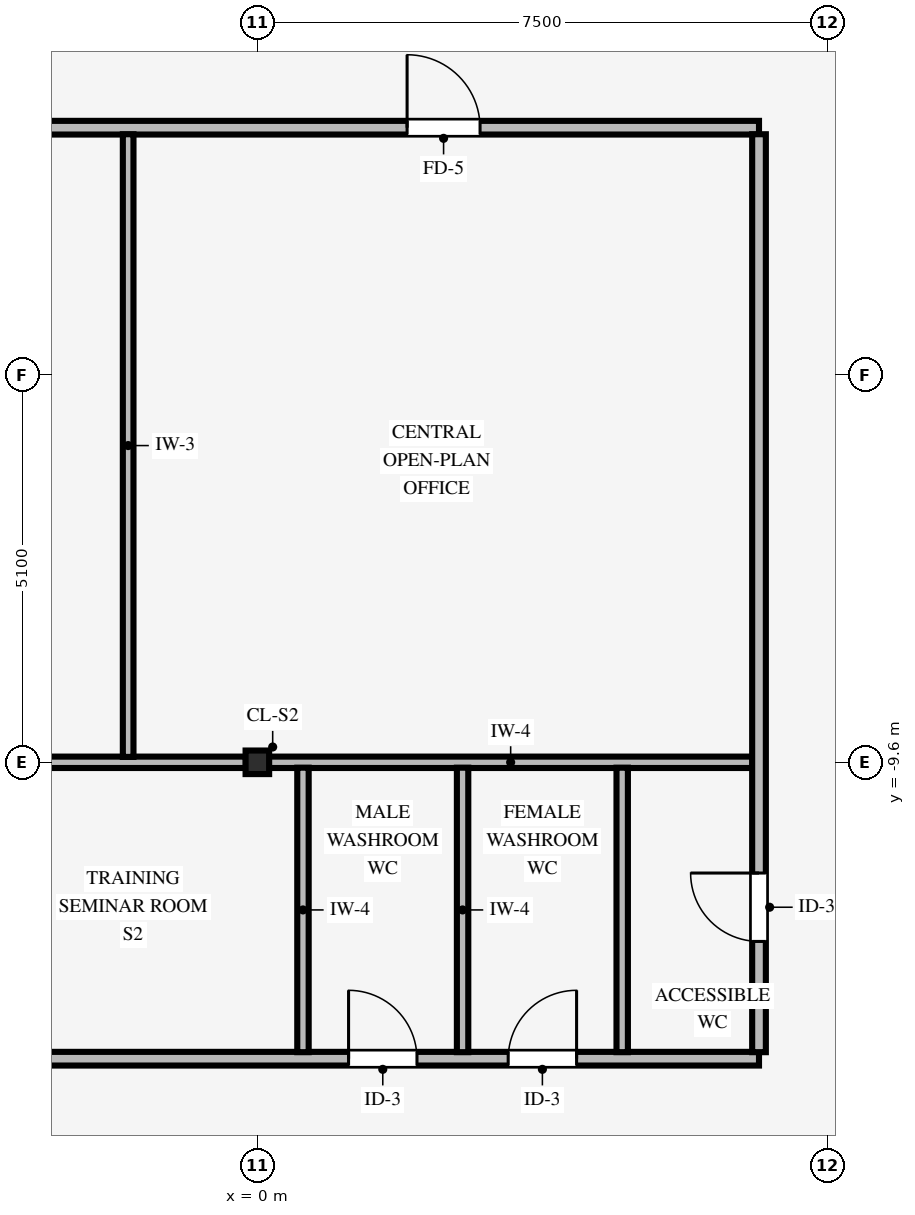
"""IFC4 building model, lengths in metres.
Left out: names, types, materials, properties, quantities, classifications, styles, units other than length and angle.
Written with IfcOpenShell. Run it as: python <this file> out.ifc"""

import sys

from ifc_helpers import new_model, si_unit, direction, frame, frame_2d, origin, origin_2d, place, context, subcontext, project, spatial, rectangle, i_section, extrude, source, transform, mapped, element, fill, save


model = new_model("IFC4")
c1 = context("Model", 3, precision=1e-05, world=origin(), true_north=direction((0.0, 1.0)))
c2 = subcontext(c1, "Body", "Model", "MODEL_VIEW")
j1 = project(units=[si_unit("LENGTHUNIT", "METRE"), si_unit("PLANEANGLEUNIT", "RADIAN")], contexts=[c1])
p1 = place(None, origin())
s1 = spatial("IfcSite", under=j1, at=p1, CompositionType="ELEMENT")
p2 = place(p1, origin())
s2 = spatial("IfcBuilding", under=s1, at=p2, CompositionType="ELEMENT")
p3 = place(p2, frame((0.0, 0.0, 216.45)))
s3 = spatial("IfcBuildingStorey", under=s2, at=p3, CompositionType="ELEMENT", Elevation=216.45)
p4 = place(p3, frame((0.0, -9.6, 0.0), z_axis=(0.0, 0.0, 1.0), x_axis=(1.0, 0.0, 0.0)))
e1 = element("IfcColumn", 1, at=p4, inside=s3, PredefinedType="COLUMN", context=c2, shape_type="SweptSolid", body=[
    extrude(i_section(OverallWidth=0.31, OverallDepth=0.31, WebThickness=0.015, FlangeThickness=0.015, FilletRadius=0.015, at=origin_2d()), origin(), (0.0, 0.0, 1.0), 3.37),
])
p5 = place(p3, frame((-17.7, -13.5, 0.0), z_axis=(0.0, 0.0, 1.0), x_axis=(1.0, 0.0, 0.0)))
e2 = element("IfcWall", 2, at=p5, inside=s3, PredefinedType="PARTITIONING", context=c2, shape_type="SweptSolid", body=[
    extrude(rectangle(XDim=24.3, YDim=0.18, at=frame_2d((12.15, 0.0))), origin(), (0.0, 0.0, 1.0), 3.008),
])
p6 = place(p5, frame((12.215, 0.0, 0.0)))
e3 = element("IfcOpeningElement", 3, at=p6, cuts=e2, PredefinedType="OPENING", context=c2, shape_type="SweptSolid", body=[
    extrude(rectangle(XDim=0.96, YDim=2.1, at=frame_2d((0.48, 1.05))), frame((0.0, 0.1, 0.0), z_axis=(0.0, -1.0, 0.0), x_axis=(1.0, 0.0, 0.0)), (0.0, 0.0, 1.0), 0.2),
])
p7 = place(p5, frame((3.065, 0.0, 0.0)))
e4 = element("IfcOpeningElement", 4, at=p7, cuts=e2, PredefinedType="OPENING", context=c2, shape_type="SweptSolid", body=[
    extrude(rectangle(XDim=0.96, YDim=2.1, at=frame_2d((0.48, 1.05))), frame((0.0, 0.1, 0.0), z_axis=(0.0, -1.0, 0.0), x_axis=(1.0, 0.0, 0.0)), (0.0, 0.0, 1.0), 0.2),
])
p8 = place(p5, frame((18.9, 0.0, 0.0)))
e5 = element("IfcOpeningElement", 5, at=p8, cuts=e2, PredefinedType="OPENING", context=c2, shape_type="SweptSolid", body=[
    extrude(rectangle(XDim=0.9, YDim=2.1, at=frame_2d((0.45, 1.05))), frame((0.0, 0.1, 0.0), z_axis=(0.0, -1.0, 0.0), x_axis=(1.0, 0.0, 0.0)), (0.0, 0.0, 1.0), 0.2),
])
p9 = place(p5, frame((21.0, 0.0, 0.0)))
e6 = element("IfcOpeningElement", 6, at=p9, cuts=e2, PredefinedType="OPENING", context=c2, shape_type="SweptSolid", body=[
    extrude(rectangle(XDim=0.9, YDim=2.1, at=frame_2d((0.45, 1.05))), frame((0.0, 0.1, 0.0), z_axis=(0.0, -1.0, 0.0), x_axis=(1.0, 0.0, 0.0)), (0.0, 0.0, 1.0), 0.2),
])
p10 = place(p3, frame((-8.529, -9.6, 0.0), z_axis=(0.0, 0.0, 1.0), x_axis=(1.0, 0.0, 0.0)))
e7 = element("IfcWall", 7, at=p10, inside=s3, PredefinedType="PARTITIONING", context=c2, shape_type="SweptSolid", body=[
    extrude(rectangle(XDim=8.378, YDim=0.15, at=frame_2d((4.189, 0.0))), origin(), (0.0, 0.0, 1.0), 2.405),
])
p11 = place(p3, frame((0.151, -9.6, 0.0), z_axis=(0.0, 0.0, 1.0), x_axis=(1.0, 0.0, 0.0)))
e8 = element("IfcWall", 8, at=p11, inside=s3, PredefinedType="PARTITIONING", context=c2, shape_type="SweptSolid", body=[
    extrude(rectangle(XDim=6.363, YDim=0.15, at=frame_2d((3.182, 0.0))), origin(), (0.0, 0.0, 1.0), 2.405),
])
p12 = place(p3, frame((-9.0, -1.25, 0.0), z_axis=(0.0, 0.0, 1.0), x_axis=(1.0, 0.0, 0.0)))
e9 = element("IfcWall", 9, at=p12, inside=s3, PredefinedType="PARTITIONING", context=c2, shape_type="SweptSolid", body=[
    extrude(rectangle(XDim=15.6, YDim=0.18, at=frame_2d((7.8, 0.0))), origin(), (0.0, 0.0, 1.0), 3.36),
])
p13 = place(p12, frame((10.97, 0.0, 0.0)))
e10 = element("IfcOpeningElement", 10, at=p13, cuts=e9, PredefinedType="OPENING", context=c2, shape_type="SweptSolid", body=[
    extrude(rectangle(XDim=0.96, YDim=2.1, at=frame_2d((0.48, 1.05))), frame((0.0, 0.1, 0.0), z_axis=(0.0, -1.0, 0.0), x_axis=(1.0, 0.0, 0.0)), (0.0, 0.0, 1.0), 0.2),
])
p14 = place(p12, frame((3.17, 0.0, 0.0)))
e11 = element("IfcOpeningElement", 11, at=p14, cuts=e9, PredefinedType="OPENING", context=c2, shape_type="SweptSolid", body=[
    extrude(rectangle(XDim=0.96, YDim=2.1, at=frame_2d((0.48, 1.05))), frame((0.0, 0.1, 0.0), z_axis=(0.0, -1.0, 0.0), x_axis=(1.0, 0.0, 0.0)), (0.0, 0.0, 1.0), 0.2),
])
p15 = place(p3, frame((-1.7, -9.529, 0.0), z_axis=(0.0, 0.0, 1.0), x_axis=(0.0, 1.0, 0.0)))
e12 = element("IfcWall", 12, at=p15, inside=s3, PredefinedType="PARTITIONING", context=c2, shape_type="SweptSolid", body=[
    extrude(rectangle(XDim=8.193, YDim=0.14, at=frame_2d((4.097, 0.0))), origin(), (0.0, 0.0, 1.0), 3.36),
])
for number, where, z_axis, x_axis in (
    (13, (0.6, -13.414, 0.0), (0.0, 0.0, 1.0), (0.0, 1.0, 0.0)),
    (14, (2.7, -13.414, 0.0), (0.0, 0.0, 1.0), (0.0, 1.0, 0.0)),
    (15, (4.8, -13.414, 0.0), (0.0, 0.0, 1.0), (0.0, 1.0, 0.0)),
):
    element("IfcWall", number, at=place(p3, frame(where, z_axis=z_axis, x_axis=x_axis)), inside=s3, PredefinedType="PARTITIONING", context=c2, shape_type="SweptSolid", body=[
        extrude(rectangle(XDim=3.743, YDim=0.15, at=frame_2d((1.872, 0.0))), origin(), (0.0, 0.0, 1.0), 3.36),
    ])
p16 = place(p3, frame((6.6, -13.414, 0.0), z_axis=(0.0, 0.0, 1.0), x_axis=(0.0, 1.0, 0.0)))
e16 = element("IfcWall", 16, at=p16, inside=s3, PredefinedType="PARTITIONING", context=c2, shape_type="SweptSolid", body=[
    extrude(rectangle(XDim=12.078, YDim=0.18, at=frame_2d((6.039, 0.0))), origin(), (0.0, 0.0, 1.0), 3.36),
])
p17 = place(p16, frame((1.457, 0.0, 0.0)))
e17 = element("IfcOpeningElement", 17, at=p17, cuts=e16, PredefinedType="OPENING", context=c2, shape_type="SweptSolid", body=[
    extrude(rectangle(XDim=0.9, YDim=2.1, at=frame_2d((0.45, 1.05))), frame((0.0, 0.1, 0.0), z_axis=(0.0, -1.0, 0.0), x_axis=(1.0, 0.0, 0.0)), (0.0, 0.0, 1.0), 0.2),
])
m1 = source(origin(), c2, "Body", "SweptSolid", [
    extrude(rectangle(XDim=0.96, YDim=2.1, at=frame_2d((0.48, 1.05))), frame((0.0, 0.025, 0.0), z_axis=(0.0, -1.0, 0.0), x_axis=(1.0, 0.0, 0.0)), (0.0, 0.0, 1.0), 0.05),
])
p18 = place(p13, origin())
e18 = element("IfcDoor", 18, at=p18, inside=s3, OperationType="SINGLE_SWING_LEFT", PredefinedType="DOOR", context=c2, shape_type="MappedRepresentation", body=[
    mapped(m1, transform((0.0, 0.0, 0.0), scale=1.0)),
])
fill(e10, e18)
m2 = source(origin(), c2, "Body", "SweptSolid", [
    extrude(rectangle(XDim=0.9, YDim=2.1, at=frame_2d((0.45, 1.05))), frame((0.0, 0.025, 0.0), z_axis=(0.0, -1.0, 0.0), x_axis=(1.0, 0.0, 0.0)), (0.0, 0.0, 1.0), 0.05),
])
p19 = place(p17, origin())
e19 = element("IfcDoor", 19, at=p19, inside=s3, OperationType="SINGLE_SWING_RIGHT", PredefinedType="DOOR", context=c2, shape_type="MappedRepresentation", body=[
    mapped(m2, transform((0.0, 0.0, 0.0), scale=1.0)),
])
fill(e17, e19)
p20 = place(p8, origin())
e20 = element("IfcDoor", 20, at=p20, inside=s3, OperationType="SINGLE_SWING_LEFT", PredefinedType="DOOR", context=c2, shape_type="MappedRepresentation", body=[
    mapped(m2, transform((0.0, 0.0, 0.0), scale=1.0)),
])
fill(e5, e20)
p21 = place(p9, origin())
e21 = element("IfcDoor", 21, at=p21, inside=s3, OperationType="SINGLE_SWING_RIGHT", PredefinedType="DOOR", context=c2, shape_type="MappedRepresentation", body=[
    mapped(m2, transform((0.0, 0.0, 0.0), scale=1.0)),
])
fill(e6, e21)
save(model, sys.argv[1])
